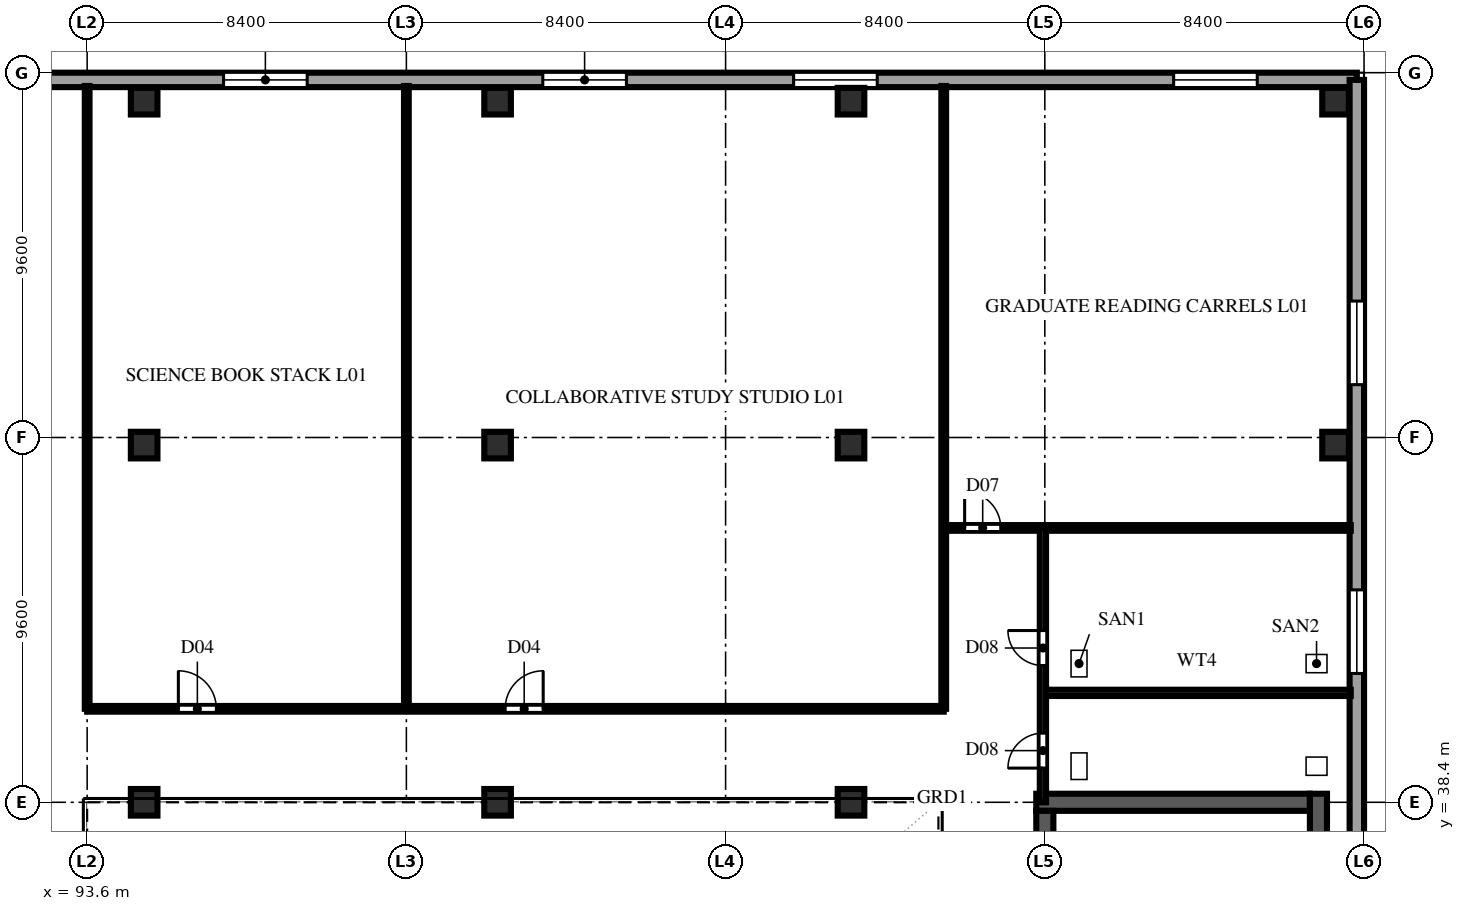
"""IFC4 building model, lengths in metres.
Left out: names, types, materials, properties, quantities, classifications, styles, units other than length and angle.
Written with IfcOpenShell. Run it as: python <this file> out.ifc"""

import sys

from ifc_helpers import new_model, si_unit, direction, frame, frame_2d, origin, origin_2d, place, context, subcontext, project, spatial, rectangle, extrude, element, fill, save


model = new_model("IFC4")
c1 = context("Model", 3, precision=1e-05, world=origin(), true_north=direction((0.0, 1.0)))
c2 = subcontext(c1, "Body", "Model", "MODEL_VIEW")
j1 = project(units=[si_unit("LENGTHUNIT", "METRE"), si_unit("PLANEANGLEUNIT", "RADIAN")], contexts=[c1])
p1 = place(None, origin())
s1 = spatial("IfcSite", under=j1, at=p1, CompositionType="ELEMENT")
p2 = place(p1, origin())
s2 = spatial("IfcBuilding", under=s1, at=p2, CompositionType="ELEMENT")
p3 = place(p2, frame((0.0, 0.0, 5.2)))
s3 = spatial("IfcBuildingStorey", under=s2, at=p3, CompositionType="ELEMENT", Elevation=5.2)
p4 = place(p3, frame((118.575, 38.4, 0.0), z_axis=(0.0, 0.0, 1.0), x_axis=(1.0, 0.0, 0.0)))
e1 = element("IfcWall", 1, at=p4, inside=s3, PredefinedType="SHEAR", context=c2, shape_type="SweptSolid", body=[
    extrude(rectangle(XDim=7.2, YDim=0.45, at=frame_2d((3.6, 0.0))), origin(), (0.0, 0.0, 1.0), 4.85),
])
p5 = place(p3, frame((126.0, 18.975, 0.0), z_axis=(0.0, 0.0, 1.0), x_axis=(0.0, 1.0, 0.0)))
e2 = element("IfcWall", 2, at=p5, inside=s3, PredefinedType="SHEAR", context=c2, shape_type="SweptSolid", body=[
    extrude(rectangle(XDim=19.65, YDim=0.45, at=frame_2d((9.825, 0.0))), origin(), (0.0, 0.0, 1.0), 4.85),
])
p6 = place(p3, frame((118.8, 34.4, 0.0), z_axis=(0.0, 0.0, 1.0), x_axis=(0.0, 1.0, 0.0)))
e3 = element("IfcWall", 3, at=p6, inside=s3, PredefinedType="SHEAR", context=c2, shape_type="SweptSolid", body=[
    extrude(rectangle(XDim=3.775, YDim=0.45, at=frame_2d((1.888, 0.0))), origin(), (0.0, 0.0, 1.0), 4.85),
])
for number, where, z_axis, x_axis in (
    (4, (95.1, 38.4, 0.0), (0.0, 0.0, 1.0), (1.0, 0.0, 0.0)),
    (5, (95.1, 47.8, 0.0), (0.0, 0.0, 1.0), (1.0, 0.0, 0.0)),
    (6, (95.1, 56.85, 0.0), (0.0, 0.0, 1.0), (1.0, 0.0, 0.0)),
    (7, (104.4, 38.4, 0.0), (0.0, 0.0, 1.0), (1.0, 0.0, 0.0)),
    (8, (104.4, 47.8, 0.0), (0.0, 0.0, 1.0), (1.0, 0.0, 0.0)),
    (9, (104.4, 56.85, 0.0), (0.0, 0.0, 1.0), (1.0, 0.0, 0.0)),
    (10, (113.7, 38.4, 0.0), (0.0, 0.0, 1.0), (1.0, 0.0, 0.0)),
    (11, (113.7, 47.8, 0.0), (0.0, 0.0, 1.0), (1.0, 0.0, 0.0)),
    (12, (113.7, 56.85, 0.0), (0.0, 0.0, 1.0), (1.0, 0.0, 0.0)),
    (13, (126.45, 47.8, 0.0), (0.0, 0.0, 1.0), (1.0, 0.0, 0.0)),
    (14, (126.45, 56.85, 0.0), (0.0, 0.0, 1.0), (1.0, 0.0, 0.0)),
):
    element("IfcColumn", number, at=place(p3, frame(where, z_axis=z_axis, x_axis=x_axis)), inside=s3, PredefinedType="COLUMN", context=c2, shape_type="SweptSolid", body=[
        extrude(rectangle(XDim=0.7, YDim=0.7, at=origin_2d()), origin(), (0.0, 0.0, 1.0), 5.2),
    ])
p7 = place(p3, frame((85.39, 57.41, 0.0), z_axis=(0.0, 0.0, 1.0), x_axis=(1.0, 0.0, 0.0)))
e15 = element("IfcWall", 15, at=p7, inside=s3, PredefinedType="SOLIDWALL", context=c2, shape_type="SweptSolid", body=[
    extrude(rectangle(XDim=41.62, YDim=0.38, at=frame_2d((20.81, 0.0))), origin(), (0.0, 0.0, 1.0), 4.85),
])
p8 = place(p7, frame((5.0, 0.0, 0.85)))
e16 = element("IfcOpeningElement", 16, at=p8, cuts=e15, PredefinedType="OPENING", context=c2, shape_type="SweptSolid", body=[
    extrude(rectangle(XDim=2.2, YDim=2.25, at=frame_2d((1.1, 1.125))), frame((0.0, 0.202, 0.0), z_axis=(0.0, -1.0, 0.0), x_axis=(1.0, 0.0, 0.0)), (0.0, 0.0, 1.0), 0.404),
])
p9 = place(p7, frame((11.8, 0.0, 0.85)))
e17 = element("IfcOpeningElement", 17, at=p9, cuts=e15, PredefinedType="OPENING", context=c2, shape_type="SweptSolid", body=[
    extrude(rectangle(XDim=2.2, YDim=2.25, at=frame_2d((1.1, 1.125))), frame((0.0, 0.202, 0.0), z_axis=(0.0, -1.0, 0.0), x_axis=(1.0, 0.0, 0.0)), (0.0, 0.0, 1.0), 0.404),
])
p10 = place(p7, frame((20.2, 0.0, 0.85)))
e18 = element("IfcOpeningElement", 18, at=p10, cuts=e15, PredefinedType="OPENING", context=c2, shape_type="SweptSolid", body=[
    extrude(rectangle(XDim=2.2, YDim=2.25, at=frame_2d((1.1, 1.125))), frame((0.0, 0.202, 0.0), z_axis=(0.0, -1.0, 0.0), x_axis=(1.0, 0.0, 0.0)), (0.0, 0.0, 1.0), 0.404),
])
p11 = place(p7, frame((26.8, 0.0, 0.85)))
e19 = element("IfcOpeningElement", 19, at=p11, cuts=e15, PredefinedType="OPENING", context=c2, shape_type="SweptSolid", body=[
    extrude(rectangle(XDim=2.2, YDim=2.25, at=frame_2d((1.1, 1.125))), frame((0.0, 0.202, 0.0), z_axis=(0.0, -1.0, 0.0), x_axis=(1.0, 0.0, 0.0)), (0.0, 0.0, 1.0), 0.404),
])
p12 = place(p7, frame((36.8, 0.0, 0.85)))
e20 = element("IfcOpeningElement", 20, at=p12, cuts=e15, PredefinedType="OPENING", context=c2, shape_type="SweptSolid", body=[
    extrude(rectangle(XDim=2.2, YDim=2.25, at=frame_2d((1.1, 1.125))), frame((0.0, 0.202, 0.0), z_axis=(0.0, -1.0, 0.0), x_axis=(1.0, 0.0, 0.0)), (0.0, 0.0, 1.0), 0.404),
])
p13 = place(p3, frame((127.01, 0.19, 0.0), z_axis=(0.0, 0.0, 1.0), x_axis=(0.0, 1.0, 0.0)))
e21 = element("IfcWall", 21, at=p13, inside=s3, PredefinedType="SOLIDWALL", context=c2, shape_type="SweptSolid", body=[
    extrude(rectangle(XDim=57.22, YDim=0.38, at=frame_2d((28.61, 0.0))), origin(), (0.0, 0.0, 1.0), 4.85),
])
p14 = place(p13, frame((3.6, 0.0, 0.85)))
e22 = element("IfcOpeningElement", 22, at=p14, cuts=e21, PredefinedType="OPENING", context=c2, shape_type="SweptSolid", body=[
    extrude(rectangle(XDim=2.2, YDim=2.25, at=frame_2d((1.1, 1.125))), frame((0.0, 0.202, 0.0), z_axis=(0.0, -1.0, 0.0), x_axis=(1.0, 0.0, 0.0)), (0.0, 0.0, 1.0), 0.404),
])
p15 = place(p13, frame((11.2, 0.0, 0.85)))
e23 = element("IfcOpeningElement", 23, at=p15, cuts=e21, PredefinedType="OPENING", context=c2, shape_type="SweptSolid", body=[
    extrude(rectangle(XDim=2.2, YDim=2.25, at=frame_2d((1.1, 1.125))), frame((0.0, 0.202, 0.0), z_axis=(0.0, -1.0, 0.0), x_axis=(1.0, 0.0, 0.0)), (0.0, 0.0, 1.0), 0.404),
])
p16 = place(p13, frame((41.6, 0.0, 0.85)))
e24 = element("IfcOpeningElement", 24, at=p16, cuts=e21, PredefinedType="OPENING", context=c2, shape_type="SweptSolid", body=[
    extrude(rectangle(XDim=2.2, YDim=2.25, at=frame_2d((1.1, 1.125))), frame((0.0, 0.202, 0.0), z_axis=(0.0, -1.0, 0.0), x_axis=(1.0, 0.0, 0.0)), (0.0, 0.0, 1.0), 0.404),
])
p17 = place(p13, frame((49.2, 0.0, 0.85)))
e25 = element("IfcOpeningElement", 25, at=p17, cuts=e21, PredefinedType="OPENING", context=c2, shape_type="SweptSolid", body=[
    extrude(rectangle(XDim=2.2, YDim=2.25, at=frame_2d((1.1, 1.125))), frame((0.0, 0.202, 0.0), z_axis=(0.0, -1.0, 0.0), x_axis=(1.0, 0.0, 0.0)), (0.0, 0.0, 1.0), 0.404),
])
for number, where, z_axis, x_axis in (
    (26, (93.6, 40.86, 0.0), (0.0, 0.0, 1.0), (0.0, 1.0, 0.0)),
    (27, (102.0, 40.86, 0.0), (0.0, 0.0, 1.0), (0.0, 1.0, 0.0)),
    (28, (116.14, 40.86, 0.0), (0.0, 0.0, 1.0), (0.0, 1.0, 0.0)),
):
    element("IfcWall", number, at=place(p3, frame(where, z_axis=z_axis, x_axis=x_axis)), inside=s3, PredefinedType="PARTITIONING", context=c2, shape_type="SweptSolid", body=[
        extrude(rectangle(XDim=16.39, YDim=0.125, at=frame_2d((8.195, 0.0))), origin(), (0.0, 0.0, 1.0), 4.85),
    ])
p18 = place(p3, frame((93.6, 40.86, 0.0), z_axis=(0.0, 0.0, 1.0), x_axis=(1.0, 0.0, 0.0)))
e29 = element("IfcWall", 29, at=p18, inside=s3, PredefinedType="PARTITIONING", context=c2, shape_type="SweptSolid", body=[
    extrude(rectangle(XDim=22.54, YDim=0.15, at=frame_2d((11.27, 0.0))), origin(), (0.0, 0.0, 1.0), 4.85),
])
p19 = place(p18, frame((2.4, 0.0, 0.0)))
e30 = element("IfcOpeningElement", 30, at=p19, cuts=e29, PredefinedType="OPENING", context=c2, shape_type="SweptSolid", body=[
    extrude(rectangle(XDim=1.0, YDim=2.2, at=frame_2d((0.5, 1.1))), frame((0.0, 0.087, 0.0), z_axis=(0.0, -1.0, 0.0), x_axis=(1.0, 0.0, 0.0)), (0.0, 0.0, 1.0), 0.174),
])
p20 = place(p18, frame((11.0, 0.0, 0.0)))
e31 = element("IfcOpeningElement", 31, at=p20, cuts=e29, PredefinedType="OPENING", context=c2, shape_type="SweptSolid", body=[
    extrude(rectangle(XDim=1.0, YDim=2.2, at=frame_2d((0.5, 1.1))), frame((0.0, 0.087, 0.0), z_axis=(0.0, -1.0, 0.0), x_axis=(1.0, 0.0, 0.0)), (0.0, 0.0, 1.0), 0.174),
])
p21 = place(p3, frame((118.75, 41.28, 0.0), z_axis=(0.0, 0.0, 1.0), x_axis=(1.0, 0.0, 0.0)))
e32 = element("IfcWall", 32, at=p21, inside=s3, PredefinedType="PLUMBINGWALL", context=c2, shape_type="SweptSolid", body=[
    extrude(rectangle(XDim=8.1, YDim=0.165, at=frame_2d((4.05, 0.0))), origin(), (0.0, 0.0, 1.0), 4.85),
])
p22 = place(p3, frame((116.14, 45.62, 0.0), z_axis=(0.0, 0.0, 1.0), x_axis=(1.0, 0.0, 0.0)))
e33 = element("IfcWall", 33, at=p22, inside=s3, PredefinedType="PARTITIONING", context=c2, shape_type="SweptSolid", body=[
    extrude(rectangle(XDim=10.71, YDim=0.15, at=frame_2d((5.355, 0.0))), origin(), (0.0, 0.0, 1.0), 4.85),
])
p23 = place(p22, frame((0.55, 0.0, 0.0)))
e34 = element("IfcOpeningElement", 34, at=p23, cuts=e33, PredefinedType="OPENING", context=c2, shape_type="SweptSolid", body=[
    extrude(rectangle(XDim=0.95, YDim=2.15, at=frame_2d((0.475, 1.075))), frame((0.0, 0.087, 0.0), z_axis=(0.0, -1.0, 0.0), x_axis=(1.0, 0.0, 0.0)), (0.0, 0.0, 1.0), 0.174),
])
p24 = place(p3, frame((118.75, 38.4, 0.0), z_axis=(0.0, 0.0, 1.0), x_axis=(0.0, 1.0, 0.0)))
e35 = element("IfcWall", 35, at=p24, inside=s3, PredefinedType="PLUMBINGWALL", context=c2, shape_type="SweptSolid", body=[
    extrude(rectangle(XDim=7.22, YDim=0.165, at=frame_2d((3.61, 0.0))), origin(), (0.0, 0.0, 1.0), 4.85),
])
p25 = place(p24, frame((0.9, 0.0, 0.0)))
e36 = element("IfcOpeningElement", 36, at=p25, cuts=e35, PredefinedType="OPENING", context=c2, shape_type="SweptSolid", body=[
    extrude(rectangle(XDim=0.92, YDim=2.15, at=frame_2d((0.46, 1.075))), frame((0.0, 0.094, 0.0), z_axis=(0.0, -1.0, 0.0), x_axis=(1.0, 0.0, 0.0)), (0.0, 0.0, 1.0), 0.189),
])
p26 = place(p24, frame((3.6, 0.0, 0.0)))
e37 = element("IfcOpeningElement", 37, at=p26, cuts=e35, PredefinedType="OPENING", context=c2, shape_type="SweptSolid", body=[
    extrude(rectangle(XDim=0.92, YDim=2.15, at=frame_2d((0.46, 1.075))), frame((0.0, 0.094, 0.0), z_axis=(0.0, -1.0, 0.0), x_axis=(1.0, 0.0, 0.0)), (0.0, 0.0, 1.0), 0.189),
])
p27 = place(p9, origin())
e38 = element("IfcWindow", 38, at=p27, inside=s3, PartitioningType="DOUBLE_PANEL_VERTICAL", PredefinedType="WINDOW", context=c2, shape_type="SweptSolid", body=[
    extrude(rectangle(XDim=2.2, YDim=2.25, at=frame_2d((1.1, 1.125))), frame((0.0, 0.11, 0.0), z_axis=(0.0, -1.0, 0.0), x_axis=(1.0, 0.0, 0.0)), (0.0, 0.0, 1.0), 0.06),
])
fill(e17, e38)
p28 = place(p10, origin())
e39 = element("IfcWindow", 39, at=p28, inside=s3, PartitioningType="DOUBLE_PANEL_VERTICAL", PredefinedType="WINDOW", context=c2, shape_type="SweptSolid", body=[
    extrude(rectangle(XDim=2.2, YDim=2.25, at=frame_2d((1.1, 1.125))), frame((0.0, 0.11, 0.0), z_axis=(0.0, -1.0, 0.0), x_axis=(1.0, 0.0, 0.0)), (0.0, 0.0, 1.0), 0.06),
])
fill(e18, e39)
p29 = place(p11, origin())
e40 = element("IfcWindow", 40, at=p29, inside=s3, PartitioningType="DOUBLE_PANEL_VERTICAL", PredefinedType="WINDOW", context=c2, shape_type="SweptSolid", body=[
    extrude(rectangle(XDim=2.2, YDim=2.25, at=frame_2d((1.1, 1.125))), frame((0.0, 0.11, 0.0), z_axis=(0.0, -1.0, 0.0), x_axis=(1.0, 0.0, 0.0)), (0.0, 0.0, 1.0), 0.06),
])
fill(e19, e40)
p30 = place(p12, origin())
e41 = element("IfcWindow", 41, at=p30, inside=s3, PartitioningType="DOUBLE_PANEL_VERTICAL", PredefinedType="WINDOW", context=c2, shape_type="SweptSolid", body=[
    extrude(rectangle(XDim=2.2, YDim=2.25, at=frame_2d((1.1, 1.125))), frame((0.0, 0.11, 0.0), z_axis=(0.0, -1.0, 0.0), x_axis=(1.0, 0.0, 0.0)), (0.0, 0.0, 1.0), 0.06),
])
fill(e20, e41)
p31 = place(p16, origin())
e42 = element("IfcWindow", 42, at=p31, inside=s3, PartitioningType="DOUBLE_PANEL_VERTICAL", PredefinedType="WINDOW", context=c2, shape_type="SweptSolid", body=[
    extrude(rectangle(XDim=2.2, YDim=2.25, at=frame_2d((1.1, 1.125))), frame((0.0, 0.11, 0.0), z_axis=(0.0, -1.0, 0.0), x_axis=(1.0, 0.0, 0.0)), (0.0, 0.0, 1.0), 0.06),
])
fill(e24, e42)
p32 = place(p17, origin())
e43 = element("IfcWindow", 43, at=p32, inside=s3, PartitioningType="DOUBLE_PANEL_VERTICAL", PredefinedType="WINDOW", context=c2, shape_type="SweptSolid", body=[
    extrude(rectangle(XDim=2.2, YDim=2.25, at=frame_2d((1.1, 1.125))), frame((0.0, 0.11, 0.0), z_axis=(0.0, -1.0, 0.0), x_axis=(1.0, 0.0, 0.0)), (0.0, 0.0, 1.0), 0.06),
])
fill(e25, e43)
p33 = place(p19, origin())
e44 = element("IfcDoor", 44, at=p33, inside=s3, OperationType="SINGLE_SWING_LEFT", PredefinedType="DOOR", context=c2, shape_type="SweptSolid", body=[
    extrude(rectangle(XDim=1.0, YDim=2.2, at=frame_2d((0.5, 1.1))), frame((0.0, 0.025, 0.0), z_axis=(0.0, -1.0, 0.0), x_axis=(1.0, 0.0, 0.0)), (0.0, 0.0, 1.0), 0.05),
])
fill(e30, e44)
p34 = place(p20, origin())
e45 = element("IfcDoor", 45, at=p34, inside=s3, OperationType="SINGLE_SWING_RIGHT", PredefinedType="DOOR", context=c2, shape_type="SweptSolid", body=[
    extrude(rectangle(XDim=1.0, YDim=2.2, at=frame_2d((0.5, 1.1))), frame((0.0, 0.025, 0.0), z_axis=(0.0, -1.0, 0.0), x_axis=(1.0, 0.0, 0.0)), (0.0, 0.0, 1.0), 0.05),
])
fill(e31, e45)
p35 = place(p23, origin())
e46 = element("IfcDoor", 46, at=p35, inside=s3, OperationType="SINGLE_SWING_LEFT", PredefinedType="DOOR", context=c2, shape_type="SweptSolid", body=[
    extrude(rectangle(XDim=0.95, YDim=2.15, at=frame_2d((0.475, 1.075))), frame((0.0, 0.025, 0.0), z_axis=(0.0, -1.0, 0.0), x_axis=(1.0, 0.0, 0.0)), (0.0, 0.0, 1.0), 0.05),
])
fill(e34, e46)
p36 = place(p25, origin())
e47 = element("IfcDoor", 47, at=p36, inside=s3, OperationType="SINGLE_SWING_LEFT", PredefinedType="DOOR", context=c2, shape_type="SweptSolid", body=[
    extrude(rectangle(XDim=0.92, YDim=2.15, at=frame_2d((0.46, 1.075))), frame((0.0, 0.025, 0.0), z_axis=(0.0, -1.0, 0.0), x_axis=(1.0, 0.0, 0.0)), (0.0, 0.0, 1.0), 0.05),
])
fill(e36, e47)
p37 = place(p26, origin())
e48 = element("IfcDoor", 48, at=p37, inside=s3, OperationType="SINGLE_SWING_RIGHT", PredefinedType="DOOR", context=c2, shape_type="SweptSolid", body=[
    extrude(rectangle(XDim=0.92, YDim=2.15, at=frame_2d((0.46, 1.075))), frame((0.0, 0.025, 0.0), z_axis=(0.0, -1.0, 0.0), x_axis=(1.0, 0.0, 0.0)), (0.0, 0.0, 1.0), 0.05),
])
fill(e37, e48)
save(model, sys.argv[1])
